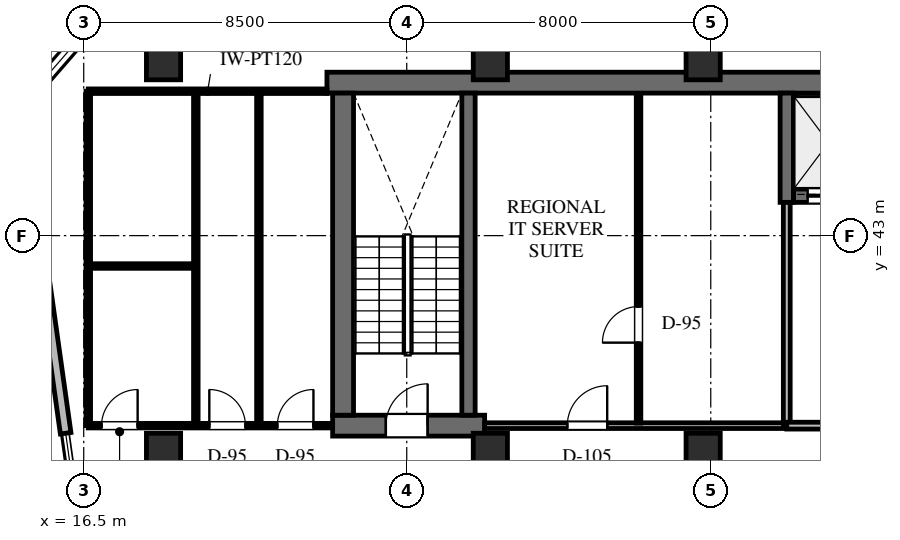
"""IFC4 building model, lengths in metres.
Left out: names, types, materials, properties, quantities, classifications, styles, units other than length and angle.
Written with IfcOpenShell. Run it as: python <this file> out.ifc"""

import sys

from ifc_helpers import new_model, si_unit, direction, frame, frame_2d, origin, origin_2d, place, context, subcontext, project, spatial, rectangle, extrude, element, fill, save


model = new_model("IFC4")
c1 = context("Model", 3, precision=1e-05, world=origin(), true_north=direction((0.0, 1.0)))
c2 = subcontext(c1, "Body", "Model", "MODEL_VIEW")
j1 = project(units=[si_unit("LENGTHUNIT", "METRE"), si_unit("PLANEANGLEUNIT", "RADIAN")], contexts=[c1])
p1 = place(None, origin())
s1 = spatial("IfcSite", under=j1, at=p1, CompositionType="ELEMENT")
p2 = place(p1, origin())
s2 = spatial("IfcBuilding", under=s1, at=p2, CompositionType="ELEMENT")
p3 = place(p2, frame((0.0, 0.0, 204.5)))
s3 = spatial("IfcBuildingStorey", under=s2, at=p3, CompositionType="ELEMENT", Elevation=204.5)
p4 = place(p3, frame((22.9, 47.025, 0.0), z_axis=(0.0, 0.0, 1.0), x_axis=(1.0, 0.0, 0.0)))
e1 = element("IfcWall", 1, at=p4, inside=s3, PredefinedType="SHEAR", context=c2, shape_type="SweptSolid", body=[
    extrude(rectangle(XDim=43.5, YDim=0.55, at=frame_2d((21.75, 0.0))), origin(), (0.0, 0.0, 1.0), 4.0),
])
p5 = place(p3, frame((35.175, 44.05, 0.0), z_axis=(0.0, 0.0, 1.0), x_axis=(1.0, 0.0, 0.0)))
e2 = element("IfcWall", 2, at=p5, inside=s3, PredefinedType="SHEAR", context=c2, shape_type="SweptSolid", body=[
    extrude(rectangle(XDim=9.7, YDim=0.35, at=frame_2d((4.85, 0.0))), origin(), (0.0, 0.0, 1.0), 4.0),
])
p6 = place(p5, frame((0.375, 0.0, 0.0)))
e3 = element("IfcOpeningElement", 3, at=p6, cuts=e2, PredefinedType="OPENING", context=c2, shape_type="SweptSolid", body=[
    extrude(rectangle(XDim=1.1, YDim=2.2, at=frame_2d((0.55, 1.1))), frame((0.0, 0.185, 0.0), z_axis=(0.0, -1.0, 0.0), x_axis=(1.0, 0.0, 0.0)), (0.0, 0.0, 1.0), 0.37),
])
p7 = place(p5, frame((2.375, 0.0, 0.0)))
e4 = element("IfcOpeningElement", 4, at=p7, cuts=e2, PredefinedType="OPENING", context=c2, shape_type="SweptSolid", body=[
    extrude(rectangle(XDim=1.1, YDim=2.2, at=frame_2d((0.55, 1.1))), frame((0.0, 0.185, 0.0), z_axis=(0.0, -1.0, 0.0), x_axis=(1.0, 0.0, 0.0)), (0.0, 0.0, 1.0), 0.37),
])
p8 = place(p5, frame((4.375, 0.0, 0.0)))
e5 = element("IfcOpeningElement", 5, at=p8, cuts=e2, PredefinedType="OPENING", context=c2, shape_type="SweptSolid", body=[
    extrude(rectangle(XDim=1.1, YDim=2.2, at=frame_2d((0.55, 1.1))), frame((0.0, 0.185, 0.0), z_axis=(0.0, -1.0, 0.0), x_axis=(1.0, 0.0, 0.0)), (0.0, 0.0, 1.0), 0.37),
])
p9 = place(p5, frame((6.375, 0.0, 0.0)))
e6 = element("IfcOpeningElement", 6, at=p9, cuts=e2, PredefinedType="OPENING", context=c2, shape_type="SweptSolid", body=[
    extrude(rectangle(XDim=1.1, YDim=2.2, at=frame_2d((0.55, 1.1))), frame((0.0, 0.185, 0.0), z_axis=(0.0, -1.0, 0.0), x_axis=(1.0, 0.0, 0.0)), (0.0, 0.0, 1.0), 0.37),
])
p10 = place(p3, frame((35.0, 43.875, 0.0), z_axis=(0.0, 0.0, 1.0), x_axis=(0.0, 1.0, 0.0)))
e7 = element("IfcWall", 7, at=p10, inside=s3, PredefinedType="SHEAR", context=c2, shape_type="SweptSolid", body=[
    extrude(rectangle(XDim=2.875, YDim=0.35, at=frame_2d((1.438, 0.0))), origin(), (0.0, 0.0, 1.0), 4.0),
])
p11 = place(p3, frame((23.05, 38.0, 0.0), z_axis=(0.0, 0.0, 1.0), x_axis=(1.0, 0.0, 0.0)))
e8 = element("IfcWall", 8, at=p11, inside=s3, PredefinedType="SHEAR", context=c2, shape_type="SweptSolid", body=[
    extrude(rectangle(XDim=4.0, YDim=0.55, at=frame_2d((2.0, 0.0))), origin(), (0.0, 0.0, 1.0), 4.0),
])
p12 = place(p11, frame((1.4, 0.0, 0.0)))
e9 = element("IfcOpeningElement", 9, at=p12, cuts=e8, PredefinedType="OPENING", context=c2, shape_type="SweptSolid", body=[
    extrude(rectangle(XDim=1.1, YDim=2.2, at=frame_2d((0.55, 1.1))), frame((0.0, 0.285, 0.0), z_axis=(0.0, -1.0, 0.0), x_axis=(1.0, 0.0, 0.0)), (0.0, 0.0, 1.0), 0.57),
])
p13 = place(p3, frame((23.325, 38.275, 0.0), z_axis=(0.0, 0.0, 1.0), x_axis=(0.0, 1.0, 0.0)))
e10 = element("IfcWall", 10, at=p13, inside=s3, PredefinedType="SHEAR", context=c2, shape_type="SweptSolid", body=[
    extrude(rectangle(XDim=8.475, YDim=0.55, at=frame_2d((4.238, 0.0))), origin(), (0.0, 0.0, 1.0), 4.0),
])
p14 = place(p3, frame((26.625, 38.275, 0.0), z_axis=(0.0, 0.0, 1.0), x_axis=(0.0, 1.0, 0.0)))
e11 = element("IfcWall", 11, at=p14, inside=s3, PredefinedType="SHEAR", context=c2, shape_type="SweptSolid", body=[
    extrude(rectangle(XDim=8.475, YDim=0.35, at=frame_2d((4.238, 0.0))), origin(), (0.0, 0.0, 1.0), 4.0),
])
for number, where, z_axis, x_axis in (
    (12, (32.8, 37.35, 0.0), (0.0, 0.0, 1.0), (1.0, 0.0, 0.0)),
    (13, (32.8, 47.55, 0.0), (0.0, 0.0, 1.0), (1.0, 0.0, 0.0)),
    (14, (27.2, 37.35, 0.0), (0.0, 0.0, 1.0), (1.0, 0.0, 0.0)),
    (15, (27.2, 47.55, 0.0), (0.0, 0.0, 1.0), (1.0, 0.0, 0.0)),
    (16, (18.6, 37.35, 0.0), (0.0, 0.0, 1.0), (1.0, 0.0, 0.0)),
    (17, (18.6, 47.55, 0.0), (0.0, 0.0, 1.0), (1.0, 0.0, 0.0)),
):
    element("IfcColumn", number, at=place(p3, frame(where, z_axis=z_axis, x_axis=x_axis)), inside=s3, PredefinedType="COLUMN", context=c2, shape_type="SweptSolid", body=[
        extrude(rectangle(XDim=0.9, YDim=0.9, at=origin_2d()), origin(), (0.0, 0.0, 1.0), 4.0),
    ])
p15 = place(p3, frame((16.025, 37.8, 0.0), z_axis=(0.0, 0.0, 1.0), x_axis=(-0.13918102754, 0.990266954701, 0.0)))
e18 = element("IfcWall", 18, at=p15, inside=s3, PredefinedType="STANDARD", context=c2, shape_type="SweptSolid", body=[
    extrude(rectangle(XDim=8.667, YDim=0.28, at=frame_2d((4.333, 0.0))), origin(), (0.0, 0.0, 1.0), 3.755),
])
p16 = place(p15, frame((3.374, 0.0, 0.65)))
e19 = element("IfcOpeningElement", 19, at=p16, cuts=e18, PredefinedType="OPENING", context=c2, shape_type="SweptSolid", body=[
    extrude(rectangle(XDim=1.8, YDim=2.1, at=frame_2d((0.9, 1.05))), frame((0.0, 0.15, 0.0), z_axis=(0.0, -1.0, 0.0), x_axis=(1.0, 0.0, 0.0)), (0.0, 0.0, 1.0), 0.3),
])
p17 = place(p3, frame((14.819, 46.383, 0.0), z_axis=(0.0, 0.0, 1.0), x_axis=(0.656071351282, 0.754698868442, 0.0)))
e20 = element("IfcWall", 20, at=p17, inside=s3, PredefinedType="STANDARD", context=c2, shape_type="SweptSolid", body=[
    extrude(rectangle(XDim=2.646, YDim=0.28, at=frame_2d((1.323, 0.0))), origin(), (0.0, 0.0, 1.0), 3.755),
])
p18 = place(p17, frame((0.416, 0.0, 0.65)))
e21 = element("IfcOpeningElement", 21, at=p18, cuts=e20, PredefinedType="OPENING", context=c2, shape_type="SweptSolid", body=[
    extrude(rectangle(XDim=1.8, YDim=2.1, at=frame_2d((0.9, 1.05))), frame((0.0, 0.15, 0.0), z_axis=(0.0, -1.0, 0.0), x_axis=(1.0, 0.0, 0.0)), (0.0, 0.0, 1.0), 0.3),
])
p19 = place(p3, frame((27.05, 38.0, 0.0), z_axis=(0.0, 0.0, 1.0), x_axis=(1.0, 0.0, 0.0)))
e22 = element("IfcWall", 22, at=p19, inside=s3, PredefinedType="PARTITIONING", context=c2, shape_type="SweptSolid", body=[
    extrude(rectangle(XDim=7.95, YDim=0.15, at=frame_2d((3.975, 0.0))), origin(), (0.0, 0.0, 1.0), 2.982),
])
p20 = place(p19, frame((2.175, 0.0, 0.0)))
e23 = element("IfcOpeningElement", 23, at=p20, cuts=e22, PredefinedType="OPENING", context=c2, shape_type="SweptSolid", body=[
    extrude(rectangle(XDim=1.05, YDim=2.2, at=frame_2d((0.525, 1.1))), frame((0.0, 0.085, 0.0), z_axis=(0.0, -1.0, 0.0), x_axis=(1.0, 0.0, 0.0)), (0.0, 0.0, 1.0), 0.17),
])
p21 = place(p3, frame((35.0, 38.0, 0.0), z_axis=(0.0, 0.0, 1.0), x_axis=(0.0, 1.0, 0.0)))
e24 = element("IfcWall", 24, at=p21, inside=s3, PredefinedType="STANDARD", context=c2, shape_type="SweptSolid", body=[
    extrude(rectangle(XDim=5.875, YDim=0.18, at=frame_2d((2.938, 0.0))), origin(), (0.0, 0.0, 1.0), 3.755),
])
p22 = place(p3, frame((31.1, 38.068, 0.0), z_axis=(0.0, 0.0, 1.0), x_axis=(0.0, 1.0, 0.0)))
e25 = element("IfcWall", 25, at=p22, inside=s3, PredefinedType="PARTITIONING", context=c2, shape_type="SweptSolid", body=[
    extrude(rectangle(XDim=8.674, YDim=0.12, at=frame_2d((4.337, 0.0))), origin(), (0.0, 0.0, 1.0), 3.755),
])
p23 = place(p22, frame((2.116, 0.0, 0.0)))
e26 = element("IfcOpeningElement", 26, at=p23, cuts=e25, PredefinedType="OPENING", context=c2, shape_type="SweptSolid", body=[
    extrude(rectangle(XDim=0.95, YDim=2.15, at=frame_2d((0.475, 1.075))), frame((0.0, 0.07, 0.0), z_axis=(0.0, -1.0, 0.0), x_axis=(1.0, 0.0, 0.0)), (0.0, 0.0, 1.0), 0.14),
])
p24 = place(p3, frame((35.0, 38.0, 0.0), z_axis=(0.0, 0.0, 1.0), x_axis=(1.0, 0.0, 0.0)))
e27 = element("IfcWall", 27, at=p24, inside=s3, PredefinedType="STANDARD", context=c2, shape_type="SweptSolid", body=[
    extrude(rectangle(XDim=10.05, YDim=0.18, at=frame_2d((5.025, 0.0))), origin(), (0.0, 0.0, 1.0), 2.982),
])
p25 = place(p24, frame((5.858, 0.0, 0.0)))
e28 = element("IfcOpeningElement", 28, at=p25, cuts=e27, PredefinedType="OPENING", context=c2, shape_type="SweptSolid", body=[
    extrude(rectangle(XDim=1.8, YDim=2.2, at=frame_2d((0.9, 1.1))), frame((0.0, 0.1, 0.0), z_axis=(0.0, -1.0, 0.0), x_axis=(1.0, 0.0, 0.0)), (0.0, 0.0, 1.0), 0.2),
])
p26 = place(p3, frame((16.62, 38.0, 0.0), z_axis=(0.0, 0.0, 1.0), x_axis=(1.0, 0.0, 0.0)))
e29 = element("IfcWall", 29, at=p26, inside=s3, PredefinedType="PARTITIONING", context=c2, shape_type="SweptSolid", body=[
    extrude(rectangle(XDim=6.43, YDim=0.12, at=frame_2d((3.215, 0.0))), origin(), (0.0, 0.0, 1.0), 2.982),
])
p27 = place(p26, frame((0.349, 0.0, 0.0)))
e30 = element("IfcOpeningElement", 30, at=p27, cuts=e29, PredefinedType="OPENING", context=c2, shape_type="SweptSolid", body=[
    extrude(rectangle(XDim=0.95, YDim=2.15, at=frame_2d((0.475, 1.075))), frame((0.0, 0.07, 0.0), z_axis=(0.0, -1.0, 0.0), x_axis=(1.0, 0.0, 0.0)), (0.0, 0.0, 1.0), 0.14),
])
p28 = place(p26, frame((3.185, 0.0, 0.0)))
e31 = element("IfcOpeningElement", 31, at=p28, cuts=e29, PredefinedType="OPENING", context=c2, shape_type="SweptSolid", body=[
    extrude(rectangle(XDim=0.95, YDim=2.15, at=frame_2d((0.475, 1.075))), frame((0.0, 0.07, 0.0), z_axis=(0.0, -1.0, 0.0), x_axis=(1.0, 0.0, 0.0)), (0.0, 0.0, 1.0), 0.14),
])
p29 = place(p26, frame((4.975, 0.0, 0.0)))
e32 = element("IfcOpeningElement", 32, at=p29, cuts=e29, PredefinedType="OPENING", context=c2, shape_type="SweptSolid", body=[
    extrude(rectangle(XDim=0.95, YDim=2.15, at=frame_2d((0.475, 1.075))), frame((0.0, 0.07, 0.0), z_axis=(0.0, -1.0, 0.0), x_axis=(1.0, 0.0, 0.0)), (0.0, 0.0, 1.0), 0.14),
])
p30 = place(p3, frame((16.62, 38.0, 0.0), z_axis=(0.0, 0.0, 1.0), x_axis=(0.0, 1.0, 0.0)))
e33 = element("IfcWall", 33, at=p30, inside=s3, PredefinedType="PARTITIONING", context=c2, shape_type="SweptSolid", body=[
    extrude(rectangle(XDim=8.8, YDim=0.12, at=frame_2d((4.4, 0.0))), origin(), (0.0, 0.0, 1.0), 3.755),
])
p31 = place(p3, frame((16.62, 46.8, 0.0), z_axis=(0.0, 0.0, 1.0), x_axis=(1.0, 0.0, 0.0)))
e34 = element("IfcWall", 34, at=p31, inside=s3, PredefinedType="PARTITIONING", context=c2, shape_type="SweptSolid", body=[
    extrude(rectangle(XDim=6.28, YDim=0.12, at=frame_2d((3.14, 0.0))), origin(), (0.0, 0.0, 1.0), 2.982),
])
for number, where, z_axis, x_axis in (
    (35, (19.45, 38.068, 0.0), (0.0, 0.0, 1.0), (0.0, 1.0, 0.0)),
    (36, (21.11, 38.068, 0.0), (0.0, 0.0, 1.0), (0.0, 1.0, 0.0)),
):
    element("IfcWall", number, at=place(p3, frame(where, z_axis=z_axis, x_axis=x_axis)), inside=s3, PredefinedType="PARTITIONING", context=c2, shape_type="SweptSolid", body=[
        extrude(rectangle(XDim=8.664, YDim=0.12, at=frame_2d((4.332, 0.0))), origin(), (0.0, 0.0, 1.0), 3.755),
    ])
p32 = place(p3, frame((16.688, 42.2, 0.0), z_axis=(0.0, 0.0, 1.0), x_axis=(1.0, 0.0, 0.0)))
e37 = element("IfcWall", 37, at=p32, inside=s3, PredefinedType="PARTITIONING", context=c2, shape_type="SweptSolid", body=[
    extrude(rectangle(XDim=2.694, YDim=0.12, at=frame_2d((1.347, 0.0))), origin(), (0.0, 0.0, 1.0), 2.982),
])
p33 = place(p18, origin())
e38 = element("IfcWindow", 38, at=p33, inside=s3, PartitioningType="SINGLE_PANEL", PredefinedType="WINDOW", context=c2, shape_type="SweptSolid", body=[
    extrude(rectangle(XDim=1.8, YDim=2.1, at=frame_2d((0.9, 1.05))), frame((0.0, 0.03, 0.0), z_axis=(0.0, -1.0, 0.0), x_axis=(1.0, 0.0, 0.0)), (0.0, 0.0, 1.0), 0.06),
])
fill(e21, e38)
p34 = place(p12, origin())
e39 = element("IfcDoor", 39, at=p34, inside=s3, OperationType="SINGLE_SWING_RIGHT", PredefinedType="DOOR", context=c2, shape_type="SweptSolid", body=[
    extrude(rectangle(XDim=1.1, YDim=2.2, at=frame_2d((0.55, 1.1))), frame((0.0, 0.025, 0.0), z_axis=(0.0, -1.0, 0.0), x_axis=(1.0, 0.0, 0.0)), (0.0, 0.0, 1.0), 0.05),
])
fill(e9, e39)
p35 = place(p6, origin())
e40 = element("IfcDoor", 40, at=p35, inside=s3, OperationType="DOUBLE_DOOR_SLIDING", PredefinedType="DOOR", context=c2, shape_type="SweptSolid", body=[
    extrude(rectangle(XDim=1.1, YDim=2.2, at=frame_2d((0.55, 1.1))), frame((0.0, 0.025, 0.0), z_axis=(0.0, -1.0, 0.0), x_axis=(1.0, 0.0, 0.0)), (0.0, 0.0, 1.0), 0.05),
])
fill(e3, e40)
p36 = place(p20, origin())
e41 = element("IfcDoor", 41, at=p36, inside=s3, OperationType="SINGLE_SWING_RIGHT", PredefinedType="DOOR", context=c2, shape_type="SweptSolid", body=[
    extrude(rectangle(XDim=1.05, YDim=2.2, at=frame_2d((0.525, 1.1))), frame((0.0, 0.025, 0.0), z_axis=(0.0, -1.0, 0.0), x_axis=(1.0, 0.0, 0.0)), (0.0, 0.0, 1.0), 0.05),
])
fill(e23, e41)
p37 = place(p23, origin())
e42 = element("IfcDoor", 42, at=p37, inside=s3, OperationType="SINGLE_SWING_LEFT", PredefinedType="DOOR", context=c2, shape_type="SweptSolid", body=[
    extrude(rectangle(XDim=0.95, YDim=2.15, at=frame_2d((0.475, 1.075))), frame((0.0, 0.025, 0.0), z_axis=(0.0, -1.0, 0.0), x_axis=(1.0, 0.0, 0.0)), (0.0, 0.0, 1.0), 0.05),
])
fill(e26, e42)
p38 = place(p27, origin())
e43 = element("IfcDoor", 43, at=p38, inside=s3, OperationType="SINGLE_SWING_RIGHT", PredefinedType="DOOR", context=c2, shape_type="SweptSolid", body=[
    extrude(rectangle(XDim=0.95, YDim=2.15, at=frame_2d((0.475, 1.075))), frame((0.0, 0.025, 0.0), z_axis=(0.0, -1.0, 0.0), x_axis=(1.0, 0.0, 0.0)), (0.0, 0.0, 1.0), 0.05),
])
fill(e30, e43)
p39 = place(p28, origin())
e44 = element("IfcDoor", 44, at=p39, inside=s3, OperationType="SINGLE_SWING_LEFT", PredefinedType="DOOR", context=c2, shape_type="SweptSolid", body=[
    extrude(rectangle(XDim=0.95, YDim=2.15, at=frame_2d((0.475, 1.075))), frame((0.0, 0.025, 0.0), z_axis=(0.0, -1.0, 0.0), x_axis=(1.0, 0.0, 0.0)), (0.0, 0.0, 1.0), 0.05),
])
fill(e31, e44)
p40 = place(p29, origin())
e45 = element("IfcDoor", 45, at=p40, inside=s3, OperationType="SINGLE_SWING_RIGHT", PredefinedType="DOOR", context=c2, shape_type="SweptSolid", body=[
    extrude(rectangle(XDim=0.95, YDim=2.15, at=frame_2d((0.475, 1.075))), frame((0.0, 0.025, 0.0), z_axis=(0.0, -1.0, 0.0), x_axis=(1.0, 0.0, 0.0)), (0.0, 0.0, 1.0), 0.05),
])
fill(e32, e45)
save(model, sys.argv[1])
